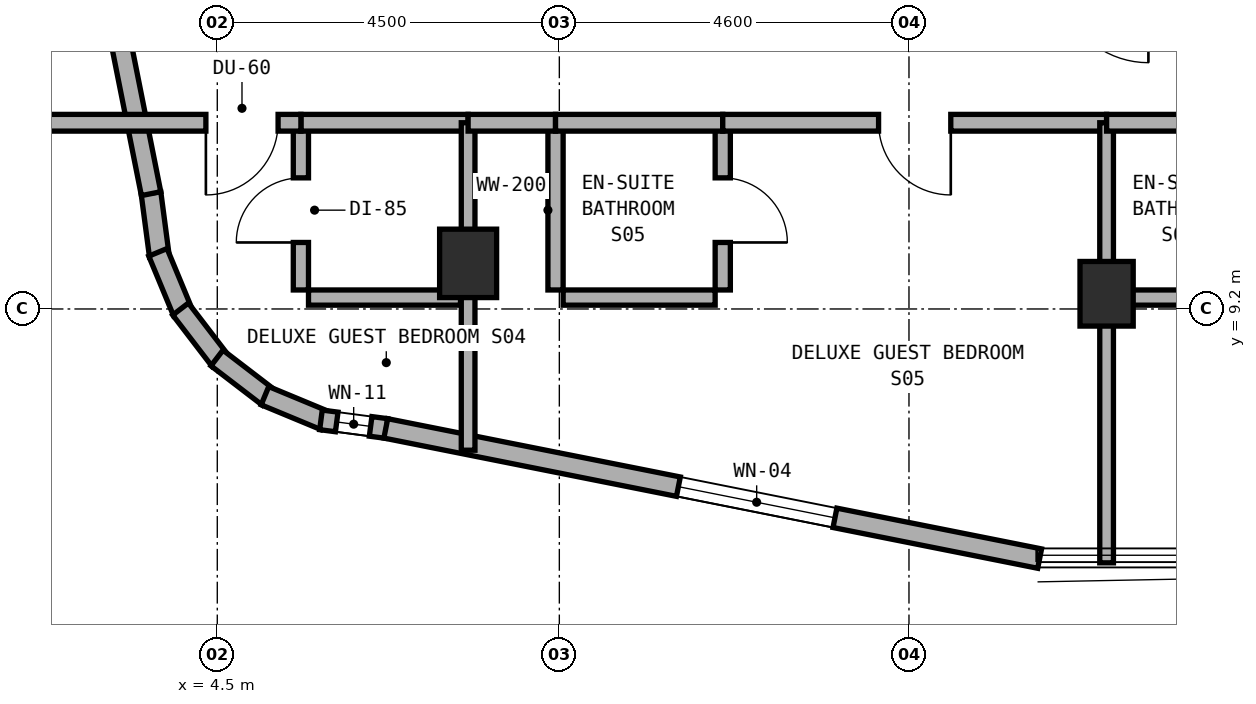
"""IFC4 building model, lengths in metres.
Left out: names, types, materials, properties, quantities, classifications, styles, units other than length and angle.
Written with IfcOpenShell. Run it as: python <this file> out.ifc"""

import sys

from ifc_helpers import new_model, si_unit, direction, frame, frame_2d, origin, origin_2d, place, context, subcontext, project, spatial, rectangle, extrude, element, fill, save


model = new_model("IFC4")
c1 = context("Model", 3, precision=1e-05, world=origin(), true_north=direction((0.0, 1.0)))
c2 = subcontext(c1, "Body", "Model", "MODEL_VIEW")
j1 = project(units=[si_unit("LENGTHUNIT", "METRE"), si_unit("PLANEANGLEUNIT", "RADIAN")], contexts=[c1])
p1 = place(None, origin())
s1 = spatial("IfcSite", under=j1, at=p1, CompositionType="ELEMENT")
p2 = place(p1, origin())
s2 = spatial("IfcBuilding", under=s1, at=p2, CompositionType="ELEMENT")
p3 = place(p2, frame((0.0, 0.0, 202.7)))
s3 = spatial("IfcBuildingStorey", under=s2, at=p3, CompositionType="ELEMENT", Elevation=202.7)
p4 = place(p3, frame((16.2, 9.4, 0.0), z_axis=(0.0, 0.0, 1.0), x_axis=(1.0, 0.0, 0.0)))
e1 = element("IfcColumn", 1, at=p4, inside=s3, PredefinedType="COLUMN", context=c2, shape_type="SweptSolid", body=[
    extrude(rectangle(XDim=0.7, YDim=0.85, at=origin_2d()), origin(), (0.0, 0.0, 1.0), 3.6),
])
p5 = place(p3, frame((7.8, 9.8, 0.0), z_axis=(0.0, 0.0, 1.0), x_axis=(1.0, 0.0, 0.0)))
e2 = element("IfcColumn", 2, at=p5, inside=s3, PredefinedType="COLUMN", context=c2, shape_type="SweptSolid", body=[
    extrude(rectangle(XDim=0.75, YDim=0.9, at=origin_2d()), origin(), (0.0, 0.0, 1.0), 3.6),
])
p6 = place(p3, frame((3.628, 10.725, 0.0), z_axis=(0.0, 0.0, 1.0), x_axis=(0.130954667764, -0.9913883573, 0.0)))
e3 = element("IfcWall", 3, at=p6, inside=s3, PredefinedType="STANDARD", context=c2, shape_type="SweptSolid", body=[
    extrude(rectangle(XDim=0.833, YDim=0.26, at=frame_2d((0.417, 0.0))), origin(), (0.0, 0.0, 1.0), 3.32),
])
p7 = place(p3, frame((3.719, 9.945, 0.0), z_axis=(0.0, 0.0, 1.0), x_axis=(0.382985169477, -0.923754491172, 0.0)))
e4 = element("IfcWall", 4, at=p7, inside=s3, PredefinedType="STANDARD", context=c2, shape_type="SweptSolid", body=[
    extrude(rectangle(XDim=0.851, YDim=0.26, at=frame_2d((0.426, 0.0))), origin(), (0.0, 0.0, 1.0), 3.32),
])
for number, where, z_axis, x_axis in (
    (5, (4.017, 9.199, 0.0), (0.0, 0.0, 1.0), (0.608, -0.794, 0.0)),
    (6, (4.496, 8.555, 0.0), (0.0, 0.0, 1.0), (0.794, -0.608, 0.0)),
):
    element("IfcWall", number, at=place(p3, frame(where, z_axis=z_axis, x_axis=x_axis)), inside=s3, PredefinedType="STANDARD", context=c2, shape_type="SweptSolid", body=[
        extrude(rectangle(XDim=0.85, YDim=0.26, at=frame_2d((0.425, 0.0))), origin(), (0.0, 0.0, 1.0), 3.32),
    ])
p8 = place(p3, frame((5.127, 8.059, 0.0), z_axis=(0.0, 0.0, 1.0), x_axis=(0.923652976167, -0.383229930484, 0.0)))
e7 = element("IfcWall", 7, at=p8, inside=s3, PredefinedType="STANDARD", context=c2, shape_type="SweptSolid", body=[
    extrude(rectangle(XDim=0.851, YDim=0.26, at=frame_2d((0.426, 0.0))), origin(), (0.0, 0.0, 1.0), 3.32),
])
p9 = place(p3, frame((5.864, 7.741, 0.0), z_axis=(0.0, 0.0, 1.0), x_axis=(0.991493480548, -0.130156359936, 0.0)))
e8 = element("IfcWall", 8, at=p9, inside=s3, PredefinedType="STANDARD", context=c2, shape_type="SweptSolid", body=[
    extrude(rectangle(XDim=0.868, YDim=0.26, at=frame_2d((0.434, 0.0))), origin(), (0.0, 0.0, 1.0), 3.32),
])
p10 = place(p9, frame((0.209, 0.0, 0.85)))
e9 = element("IfcOpeningElement", 9, at=p10, cuts=e8, PredefinedType="OPENING", context=c2, shape_type="SweptSolid", body=[
    extrude(rectangle(XDim=0.45, YDim=1.5, at=frame_2d((0.225, 0.75))), frame((0.0, 0.14, 0.0), z_axis=(0.0, -1.0, 0.0), x_axis=(1.0, 0.0, 0.0)), (0.0, 0.0, 1.0), 0.28),
])
p11 = place(p3, frame((6.717, 7.629, 0.0), z_axis=(0.0, 0.0, 1.0), x_axis=(0.980745199176, -0.195291715883, 0.0)))
e10 = element("IfcWall", 10, at=p11, inside=s3, PredefinedType="STANDARD", context=c2, shape_type="SweptSolid", body=[
    extrude(rectangle(XDim=8.771, YDim=0.26, at=frame_2d((4.385, 0.0))), origin(), (0.0, 0.0, 1.0), 3.32),
])
p12 = place(p11, frame((3.925, 0.0, 0.85)))
e11 = element("IfcOpeningElement", 11, at=p12, cuts=e10, PredefinedType="OPENING", context=c2, shape_type="SweptSolid", body=[
    extrude(rectangle(XDim=2.1, YDim=1.5, at=frame_2d((1.05, 0.75))), frame((0.0, 0.14, 0.0), z_axis=(0.0, -1.0, 0.0), x_axis=(1.0, 0.0, 0.0)), (0.0, 0.0, 1.0), 0.28),
])
p13 = place(p3, frame((1.916, 19.319, 0.0), z_axis=(0.0, 0.0, 1.0), x_axis=(0.195291715883, -0.980745199176, 0.0)))
e12 = element("IfcWall", 12, at=p13, inside=s3, PredefinedType="STANDARD", context=c2, shape_type="SweptSolid", body=[
    extrude(rectangle(XDim=8.771, YDim=0.26, at=frame_2d((4.385, 0.0))), origin(), (0.0, 0.0, 1.0), 3.32),
])
p14 = place(p13, frame((2.798, 0.0, 0.85)))
e13 = element("IfcOpeningElement", 13, at=p14, cuts=e12, PredefinedType="OPENING", context=c2, shape_type="SweptSolid", body=[
    extrude(rectangle(XDim=2.1, YDim=1.5, at=frame_2d((1.05, 0.75))), frame((0.0, 0.14, 0.0), z_axis=(0.0, -1.0, 0.0), x_axis=(1.0, 0.0, 0.0)), (0.0, 0.0, 1.0), 0.28),
])
p15 = place(p3, frame((5.6, 9.45, 0.0), z_axis=(0.0, 0.0, 1.0), x_axis=(0.0, 1.0, 0.0)))
e14 = element("IfcWall", 14, at=p15, inside=s3, PredefinedType="PLUMBINGWALL", context=c2, shape_type="SweptSolid", body=[
    extrude(rectangle(XDim=2.1, YDim=0.2, at=frame_2d((1.05, 0.0))), origin(), (0.0, 0.0, 1.0), 3.32),
])
p16 = place(p15, frame((0.625, 0.0, 0.0)))
e15 = element("IfcOpeningElement", 15, at=p16, cuts=e14, PredefinedType="OPENING", context=c2, shape_type="SweptSolid", body=[
    extrude(rectangle(XDim=0.85, YDim=2.1, at=frame_2d((0.425, 1.05))), frame((0.0, 0.11, 0.0), z_axis=(0.0, -1.0, 0.0), x_axis=(1.0, 0.0, 0.0)), (0.0, 0.0, 1.0), 0.22),
])
p17 = place(p3, frame((5.7, 9.35, 0.0), z_axis=(0.0, 0.0, 1.0), x_axis=(1.0, 0.0, 0.0)))
e16 = element("IfcWall", 16, at=p17, inside=s3, PredefinedType="PLUMBINGWALL", context=c2, shape_type="SweptSolid", body=[
    extrude(rectangle(XDim=2.0, YDim=0.2, at=frame_2d((1.0, 0.0))), origin(), (0.0, 0.0, 1.0), 3.32),
])
p18 = place(p3, frame((5.6, 11.65, 0.0), z_axis=(0.0, 0.0, 1.0), x_axis=(1.0, 0.0, 0.0)))
e17 = element("IfcWall", 17, at=p18, inside=s3, PredefinedType="SOLIDWALL", context=c2, shape_type="SweptSolid", body=[
    extrude(rectangle(XDim=2.2, YDim=0.22, at=frame_2d((1.1, 0.0))), origin(), (0.0, 0.0, 1.0), 2.695),
])
p19 = place(p3, frame((1.96, 11.65, 0.0), z_axis=(0.0, 0.0, 1.0), x_axis=(1.0, 0.0, 0.0)))
e18 = element("IfcWall", 18, at=p19, inside=s3, PredefinedType="SOLIDWALL", context=c2, shape_type="SweptSolid", body=[
    extrude(rectangle(XDim=3.64, YDim=0.22, at=frame_2d((1.82, 0.0))), origin(), (0.0, 0.0, 1.0), 3.32),
])
p20 = place(p19, frame((2.39, 0.0, 0.0)))
e19 = element("IfcOpeningElement", 19, at=p20, cuts=e18, PredefinedType="OPENING", context=c2, shape_type="SweptSolid", body=[
    extrude(rectangle(XDim=0.95, YDim=2.1, at=frame_2d((0.475, 1.05))), frame((0.0, 0.12, 0.0), z_axis=(0.0, -1.0, 0.0), x_axis=(1.0, 0.0, 0.0)), (0.0, 0.0, 1.0), 0.24),
])
p21 = place(p3, frame((7.8, 7.342, 0.0), z_axis=(0.0, 0.0, 1.0), x_axis=(0.0, 1.0, 0.0)))
e20 = element("IfcWall", 20, at=p21, inside=s3, PredefinedType="SOLIDWALL", context=c2, shape_type="SweptSolid", body=[
    extrude(rectangle(XDim=4.308, YDim=0.18, at=frame_2d((2.154, 0.0))), origin(), (0.0, 0.0, 1.0), 2.695),
])
p22 = place(p3, frame((11.15, 9.45, 0.0), z_axis=(0.0, 0.0, 1.0), x_axis=(0.0, 1.0, 0.0)))
e21 = element("IfcWall", 21, at=p22, inside=s3, PredefinedType="PLUMBINGWALL", context=c2, shape_type="SweptSolid", body=[
    extrude(rectangle(XDim=2.1, YDim=0.2, at=frame_2d((1.05, 0.0))), origin(), (0.0, 0.0, 1.0), 2.845),
])
p23 = place(p22, frame((0.625, 0.0, 0.0)))
e22 = element("IfcOpeningElement", 22, at=p23, cuts=e21, PredefinedType="OPENING", context=c2, shape_type="SweptSolid", body=[
    extrude(rectangle(XDim=0.85, YDim=2.1, at=frame_2d((0.425, 1.05))), frame((0.0, 0.11, 0.0), z_axis=(0.0, -1.0, 0.0), x_axis=(1.0, 0.0, 0.0)), (0.0, 0.0, 1.0), 0.22),
])
p24 = place(p3, frame((9.05, 9.35, 0.0), z_axis=(0.0, 0.0, 1.0), x_axis=(1.0, 0.0, 0.0)))
e23 = element("IfcWall", 23, at=p24, inside=s3, PredefinedType="PLUMBINGWALL", context=c2, shape_type="SweptSolid", body=[
    extrude(rectangle(XDim=2.0, YDim=0.2, at=frame_2d((1.0, 0.0))), origin(), (0.0, 0.0, 1.0), 3.32),
])
p25 = place(p3, frame((8.95, 9.45, 0.0), z_axis=(0.0, 0.0, 1.0), x_axis=(0.0, 1.0, 0.0)))
e24 = element("IfcWall", 24, at=p25, inside=s3, PredefinedType="PLUMBINGWALL", context=c2, shape_type="SweptSolid", body=[
    extrude(rectangle(XDim=2.1, YDim=0.2, at=frame_2d((1.05, 0.0))), origin(), (0.0, 0.0, 1.0), 2.845),
])
p26 = place(p3, frame((7.8, 11.65, 0.0), z_axis=(0.0, 0.0, 1.0), x_axis=(1.0, 0.0, 0.0)))
e25 = element("IfcWall", 25, at=p26, inside=s3, PredefinedType="SOLIDWALL", context=c2, shape_type="SweptSolid", body=[
    extrude(rectangle(XDim=1.15, YDim=0.22, at=frame_2d((0.575, 0.0))), origin(), (0.0, 0.0, 1.0), 2.695),
])
p27 = place(p3, frame((8.95, 11.65, 0.0), z_axis=(0.0, 0.0, 1.0), x_axis=(1.0, 0.0, 0.0)))
e26 = element("IfcWall", 26, at=p27, inside=s3, PredefinedType="SOLIDWALL", context=c2, shape_type="SweptSolid", body=[
    extrude(rectangle(XDim=2.2, YDim=0.22, at=frame_2d((1.1, 0.0))), origin(), (0.0, 0.0, 1.0), 3.32),
])
p28 = place(p3, frame((11.15, 11.65, 0.0), z_axis=(0.0, 0.0, 1.0), x_axis=(1.0, 0.0, 0.0)))
e27 = element("IfcWall", 27, at=p28, inside=s3, PredefinedType="SOLIDWALL", context=c2, shape_type="SweptSolid", body=[
    extrude(rectangle(XDim=5.05, YDim=0.22, at=frame_2d((2.525, 0.0))), origin(), (0.0, 0.0, 1.0), 2.695),
])
p29 = place(p28, frame((2.05, 0.0, 0.0)))
e28 = element("IfcOpeningElement", 28, at=p29, cuts=e27, PredefinedType="OPENING", context=c2, shape_type="SweptSolid", body=[
    extrude(rectangle(XDim=0.95, YDim=2.1, at=frame_2d((0.475, 1.05))), frame((0.0, 0.12, 0.0), z_axis=(0.0, -1.0, 0.0), x_axis=(1.0, 0.0, 0.0)), (0.0, 0.0, 1.0), 0.24),
])
p30 = place(p3, frame((16.2, 5.86, 0.0), z_axis=(0.0, 0.0, 1.0), x_axis=(0.0, 1.0, 0.0)))
e29 = element("IfcWall", 29, at=p30, inside=s3, PredefinedType="SOLIDWALL", context=c2, shape_type="SweptSolid", body=[
    extrude(rectangle(XDim=5.79, YDim=0.18, at=frame_2d((2.895, 0.0))), origin(), (0.0, 0.0, 1.0), 2.695),
])
p31 = place(p3, frame((16.3, 9.35, 0.0), z_axis=(0.0, 0.0, 1.0), x_axis=(1.0, 0.0, 0.0)))
e30 = element("IfcWall", 30, at=p31, inside=s3, PredefinedType="PLUMBINGWALL", context=c2, shape_type="SweptSolid", body=[
    extrude(rectangle(XDim=2.0, YDim=0.2, at=frame_2d((1.0, 0.0))), origin(), (0.0, 0.0, 1.0), 3.015),
])
p32 = place(p3, frame((16.2, 11.65, 0.0), z_axis=(0.0, 0.0, 1.0), x_axis=(1.0, 0.0, 0.0)))
e31 = element("IfcWall", 31, at=p32, inside=s3, PredefinedType="SOLIDWALL", context=c2, shape_type="SweptSolid", body=[
    extrude(rectangle(XDim=2.2, YDim=0.22, at=frame_2d((1.1, 0.0))), origin(), (0.0, 0.0, 1.0), 2.695),
])
p33 = place(p12, origin())
e32 = element("IfcWindow", 32, at=p33, inside=s3, PartitioningType="SINGLE_PANEL", PredefinedType="WINDOW", context=c2, shape_type="SweptSolid", body=[
    extrude(rectangle(XDim=2.1, YDim=1.5, at=frame_2d((1.05, 0.75))), frame((0.0, 0.03, 0.0), z_axis=(0.0, -1.0, 0.0), x_axis=(1.0, 0.0, 0.0)), (0.0, 0.0, 1.0), 0.06),
])
fill(e11, e32)
p34 = place(p10, origin())
e33 = element("IfcWindow", 33, at=p34, inside=s3, PartitioningType="SINGLE_PANEL", PredefinedType="WINDOW", context=c2, shape_type="SweptSolid", body=[
    extrude(rectangle(XDim=0.45, YDim=1.5, at=frame_2d((0.225, 0.75))), frame((0.0, 0.03, 0.0), z_axis=(0.0, -1.0, 0.0), x_axis=(1.0, 0.0, 0.0)), (0.0, 0.0, 1.0), 0.06),
])
fill(e9, e33)
p35 = place(p16, origin())
e34 = element("IfcDoor", 34, at=p35, inside=s3, OperationType="SINGLE_SWING_LEFT", PredefinedType="DOOR", context=c2, shape_type="SweptSolid", body=[
    extrude(rectangle(XDim=0.85, YDim=2.1, at=frame_2d((0.425, 1.05))), frame((0.0, 0.025, 0.0), z_axis=(0.0, -1.0, 0.0), x_axis=(1.0, 0.0, 0.0)), (0.0, 0.0, 1.0), 0.05),
])
fill(e15, e34)
p36 = place(p20, frame((0.95, 0.0, 0.0), z_axis=(0.0, 0.0, 1.0), x_axis=(-1.0, 0.0, 0.0)))
e35 = element("IfcDoor", 35, at=p36, inside=s3, OperationType="SINGLE_SWING_RIGHT", PredefinedType="DOOR", context=c2, shape_type="SweptSolid", body=[
    extrude(rectangle(XDim=0.95, YDim=2.1, at=frame_2d((0.475, 1.05))), frame((0.0, 0.025, 0.0), z_axis=(0.0, -1.0, 0.0), x_axis=(1.0, 0.0, 0.0)), (0.0, 0.0, 1.0), 0.05),
])
fill(e19, e35)
p37 = place(p23, frame((0.85, 0.0, 0.0), z_axis=(0.0, 0.0, 1.0), x_axis=(-1.0, 0.0, 0.0)))
e36 = element("IfcDoor", 36, at=p37, inside=s3, OperationType="SINGLE_SWING_RIGHT", PredefinedType="DOOR", context=c2, shape_type="SweptSolid", body=[
    extrude(rectangle(XDim=0.85, YDim=2.1, at=frame_2d((0.425, 1.05))), frame((0.0, 0.025, 0.0), z_axis=(0.0, -1.0, 0.0), x_axis=(1.0, 0.0, 0.0)), (0.0, 0.0, 1.0), 0.05),
])
fill(e22, e36)
p38 = place(p29, frame((0.95, 0.0, 0.0), z_axis=(0.0, 0.0, 1.0), x_axis=(-1.0, 0.0, 0.0)))
e37 = element("IfcDoor", 37, at=p38, inside=s3, OperationType="SINGLE_SWING_LEFT", PredefinedType="DOOR", context=c2, shape_type="SweptSolid", body=[
    extrude(rectangle(XDim=0.95, YDim=2.1, at=frame_2d((0.475, 1.05))), frame((0.0, 0.025, 0.0), z_axis=(0.0, -1.0, 0.0), x_axis=(1.0, 0.0, 0.0)), (0.0, 0.0, 1.0), 0.05),
])
fill(e28, e37)
save(model, sys.argv[1])
